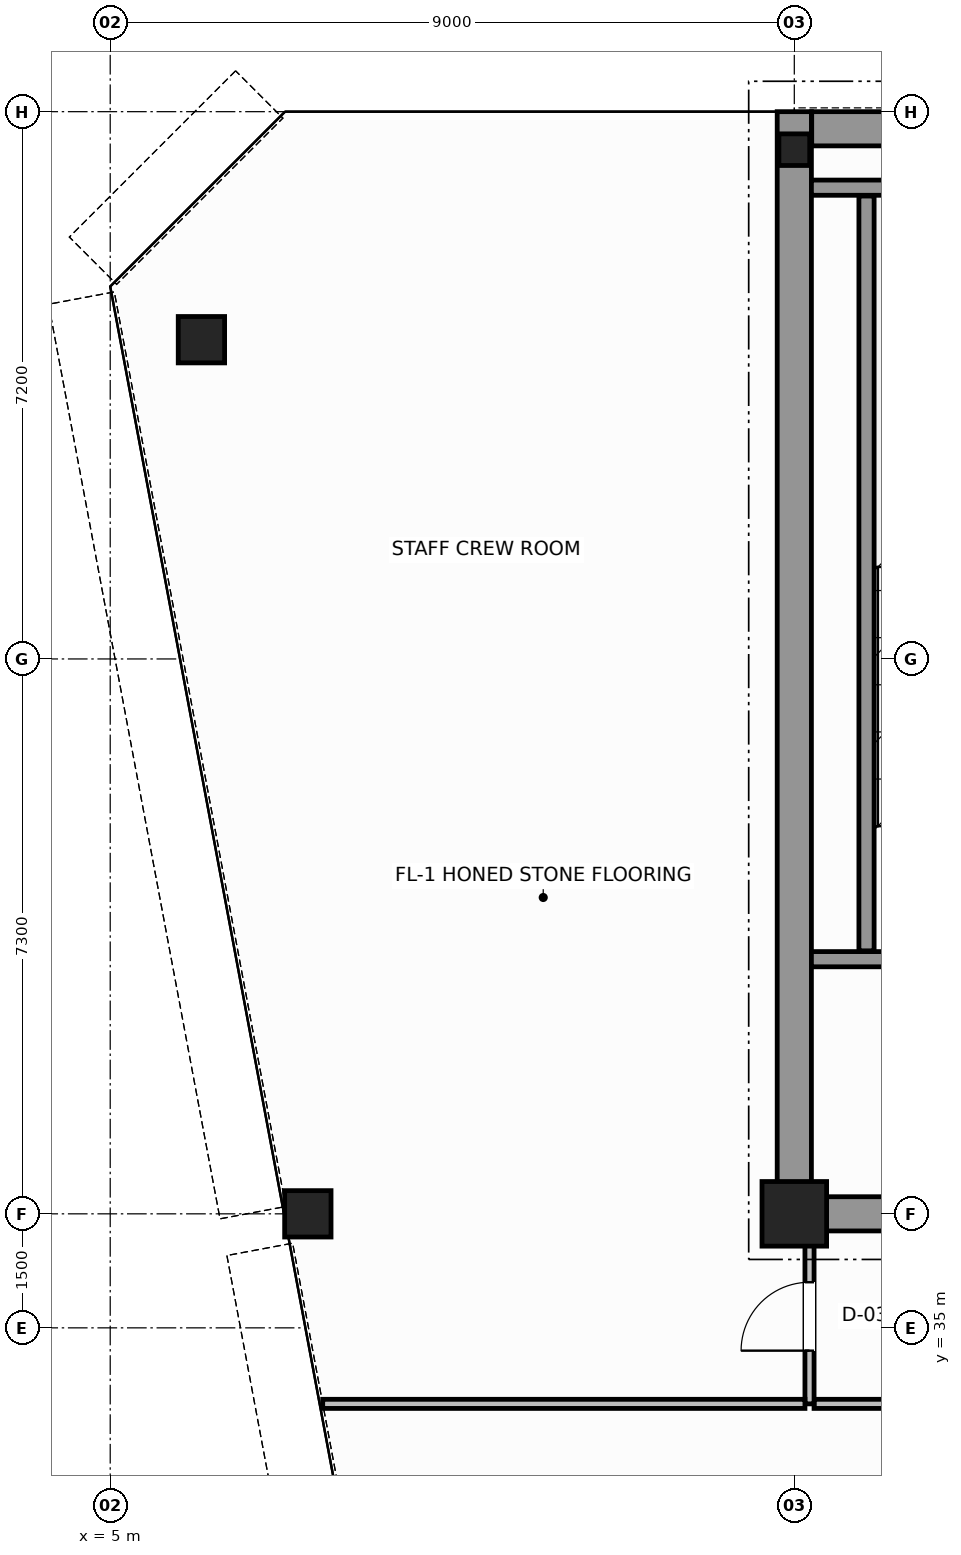
"""IFC4 building model, lengths in metres.
Left out: names, types, materials, properties, quantities, classifications, styles, units other than length and angle.
Written with IfcOpenShell. Run it as: python <this file> out.ifc"""

import sys

from ifc_helpers import new_model, si_unit, direction, frame, frame_2d, origin, origin_2d, place, context, subcontext, project, spatial, rectangle, hollow_circle, i_section, extrude, source, transform, mapped, element, fill, save


model = new_model("IFC4")
c1 = context("Model", 3, precision=1e-05, world=origin(), true_north=direction((0.0, 1.0)))
c2 = subcontext(c1, "Body", "Model", "MODEL_VIEW")
j1 = project(units=[si_unit("LENGTHUNIT", "METRE"), si_unit("PLANEANGLEUNIT", "RADIAN")], contexts=[c1])
p1 = place(None, origin())
s1 = spatial("IfcSite", under=j1, at=p1, CompositionType="ELEMENT")
p2 = place(p1, origin())
s2 = spatial("IfcBuilding", under=s1, at=p2, CompositionType="ELEMENT")
p3 = place(p2, frame((0.0, 0.0, 276.4)))
s3 = spatial("IfcBuildingStorey", under=s2, at=p3, CompositionType="ELEMENT", Elevation=276.4)
m1 = source(origin(), c2, "Body", "SweptSolid", [
    extrude(rectangle(XDim=0.85, YDim=0.85, at=origin_2d()), origin(), (0.0, 0.0, 1.0), 3.8),
])
p4 = place(p3, frame((14.0, 36.5, 0.0), z_axis=(0.0, 0.0, 1.0), x_axis=(1.0, 0.0, 0.0)))
e1 = element("IfcColumn", 1, at=p4, inside=s3, PredefinedType="COLUMN", context=c2, shape_type="MappedRepresentation", body=[
    mapped(m1, transform((0.0, 0.0, 0.0), scale=1.0)),
])
m2 = source(origin(), c2, "Body", "SweptSolid", [
    extrude(i_section(OverallWidth=0.406, OverallDepth=0.416, WebThickness=0.03, FlangeThickness=0.042, FilletRadius=0.015, at=origin_2d()), origin(), (0.0, 0.0, 1.0), 3.8),
])
p5 = place(p3, frame((14.0, 50.5, 0.0), z_axis=(0.0, 0.0, 1.0), x_axis=(1.0, 0.0, 0.0)))
e2 = element("IfcColumn", 2, at=p5, inside=s3, PredefinedType="COLUMN", context=c2, shape_type="MappedRepresentation", body=[
    mapped(m2, transform((0.0, 0.0, 0.0), scale=1.0)),
])
m3 = source(origin(), c2, "Body", "SweptSolid", [
    extrude(hollow_circle(Radius=0.305, WallThickness=0.03, at=origin_2d()), origin(), (0.0, 0.0, 1.0), 3.8),
])
for number, where, z_axis, x_axis in (
    (3, (6.2, 48.0, 0.0), (0.0, 0.0, 1.0), (1.0, 0.0, 0.0)),
    (4, (7.6, 36.5, 0.0), (0.0, 0.0, 1.0), (1.0, 0.0, 0.0)),
):
    element("IfcColumn", number, at=place(p3, frame(where, z_axis=z_axis, x_axis=x_axis)), inside=s3, PredefinedType="COLUMN", context=c2, shape_type="MappedRepresentation", body=[
        mapped(m3, transform((0.0, 0.0, 0.0), scale=1.0)),
    ])
p6 = place(p3, frame((14.229, 50.775, 0.0), z_axis=(0.0, 0.0, 1.0), x_axis=(1.0, 0.0, 0.0)))
e5 = element("IfcWall", 5, at=p6, inside=s3, PredefinedType="SHEAR", context=c2, shape_type="SweptSolid", body=[
    extrude(rectangle(XDim=19.769, YDim=0.45, at=frame_2d((9.885, 0.0))), origin(), (0.0, 0.0, 1.0), 3.8),
])
p7 = place(p3, frame((14.0, 36.5, 0.0), z_axis=(0.0, 0.0, 1.0), x_axis=(0.0, 1.0, 0.0)))
e6 = element("IfcWall", 6, at=p7, inside=s3, PredefinedType="SHEAR", context=c2, shape_type="SweptSolid", body=[
    extrude(rectangle(XDim=14.5, YDim=0.45, at=frame_2d((7.25, 0.0))), origin(), (0.0, 0.0, 1.0), 3.8),
])
p8 = place(p3, frame((14.245, 36.5, 0.0), z_axis=(0.0, 0.0, 1.0), x_axis=(1.0, 0.0, 0.0)))
e7 = element("IfcWall", 7, at=p8, inside=s3, PredefinedType="SHEAR", context=c2, shape_type="SweptSolid", body=[
    extrude(rectangle(XDim=3.955, YDim=0.45, at=frame_2d((1.978, 0.0))), origin(), (0.0, 0.0, 1.0), 2.58),
])
p9 = place(p3, frame((14.225, 39.85, 0.0), z_axis=(0.0, 0.0, 1.0), x_axis=(1.0, 0.0, 0.0)))
e8 = element("IfcWall", 8, at=p9, inside=s3, PredefinedType="SOLIDWALL", context=c2, shape_type="SweptSolid", body=[
    extrude(rectangle(XDim=4.375, YDim=0.2, at=frame_2d((2.188, 0.0))), origin(), (0.0, 0.0, 1.0), 3.8),
])
p10 = place(p9, frame((1.95, 0.0, 0.0)))
e9 = element("IfcOpeningElement", 9, at=p10, cuts=e8, PredefinedType="OPENING", context=c2, shape_type="SweptSolid", body=[
    extrude(rectangle(XDim=1.1, YDim=2.15, at=frame_2d((0.55, 1.075))), frame((0.0, 0.11, 0.0), z_axis=(0.0, -1.0, 0.0), x_axis=(1.0, 0.0, 0.0)), (0.0, 0.0, 1.0), 0.22),
])
p11 = place(p3, frame((14.225, 50.0, 0.0), z_axis=(0.0, 0.0, 1.0), x_axis=(1.0, 0.0, 0.0)))
e10 = element("IfcWall", 10, at=p11, inside=s3, PredefinedType="SOLIDWALL", context=c2, shape_type="SweptSolid", body=[
    extrude(rectangle(XDim=4.375, YDim=0.2, at=frame_2d((2.188, 0.0))), origin(), (0.0, 0.0, 1.0), 3.8),
])
p12 = place(p3, frame((14.95, 39.96, 0.0), z_axis=(0.0, 0.0, 1.0), x_axis=(0.0, 1.0, 0.0)))
e11 = element("IfcWall", 11, at=p12, inside=s3, PredefinedType="SOLIDWALL", context=c2, shape_type="SweptSolid", body=[
    extrude(rectangle(XDim=9.93, YDim=0.2, at=frame_2d((4.965, 0.0))), origin(), (0.0, 0.0, 1.0), 3.8),
])
p13 = place(p3, frame((14.26, 34.0, 0.0), z_axis=(0.0, 0.0, 1.0), x_axis=(1.0, 0.0, 0.0)))
e12 = element("IfcWall", 12, at=p13, inside=s3, PredefinedType="PARTITIONING", context=c2, shape_type="SweptSolid", body=[
    extrude(rectangle(XDim=17.28, YDim=0.12, at=frame_2d((8.64, 0.0))), origin(), (0.0, 0.0, 1.0), 3.21),
])
p14 = place(p3, frame((14.2, 34.0, 0.0), z_axis=(0.0, 0.0, 1.0), x_axis=(0.0, 1.0, 0.0)))
e13 = element("IfcWall", 13, at=p14, inside=s3, PredefinedType="PARTITIONING", context=c2, shape_type="SweptSolid", body=[
    extrude(rectangle(XDim=2.44, YDim=0.12, at=frame_2d((1.22, 0.0))), origin(), (0.0, 0.0, 1.0), 3.58),
])
p15 = place(p14, frame((0.7, 0.0, 0.0)))
e14 = element("IfcOpeningElement", 14, at=p15, cuts=e13, PredefinedType="OPENING", context=c2, shape_type="SweptSolid", body=[
    extrude(rectangle(XDim=0.9, YDim=2.15, at=frame_2d((0.45, 1.075))), frame((0.0, 0.07, 0.0), z_axis=(0.0, -1.0, 0.0), x_axis=(1.0, 0.0, 0.0)), (0.0, 0.0, 1.0), 0.14),
])
p16 = place(p3, frame((7.796, 34.0, 0.0), z_axis=(0.0, 0.0, 1.0), x_axis=(1.0, 0.0, 0.0)))
e15 = element("IfcWall", 15, at=p16, inside=s3, PredefinedType="PARTITIONING", context=c2, shape_type="SweptSolid", body=[
    extrude(rectangle(XDim=6.344, YDim=0.12, at=frame_2d((3.172, 0.0))), origin(), (0.0, 0.0, 1.0), 3.21),
])
m4 = source(origin(), c2, "Body", "SweptSolid", [
    extrude(rectangle(XDim=0.9, YDim=2.15, at=frame_2d((0.45, 1.075))), frame((0.0, 0.025, 0.0), z_axis=(0.0, -1.0, 0.0), x_axis=(1.0, 0.0, 0.0)), (0.0, 0.0, 1.0), 0.05),
])
p17 = place(p15, origin())
e16 = element("IfcDoor", 16, at=p17, inside=s3, OperationType="SINGLE_SWING_LEFT", PredefinedType="DOOR", context=c2, shape_type="MappedRepresentation", body=[
    mapped(m4, transform((0.0, 0.0, 0.0), scale=1.0)),
])
fill(e14, e16)
save(model, sys.argv[1])
